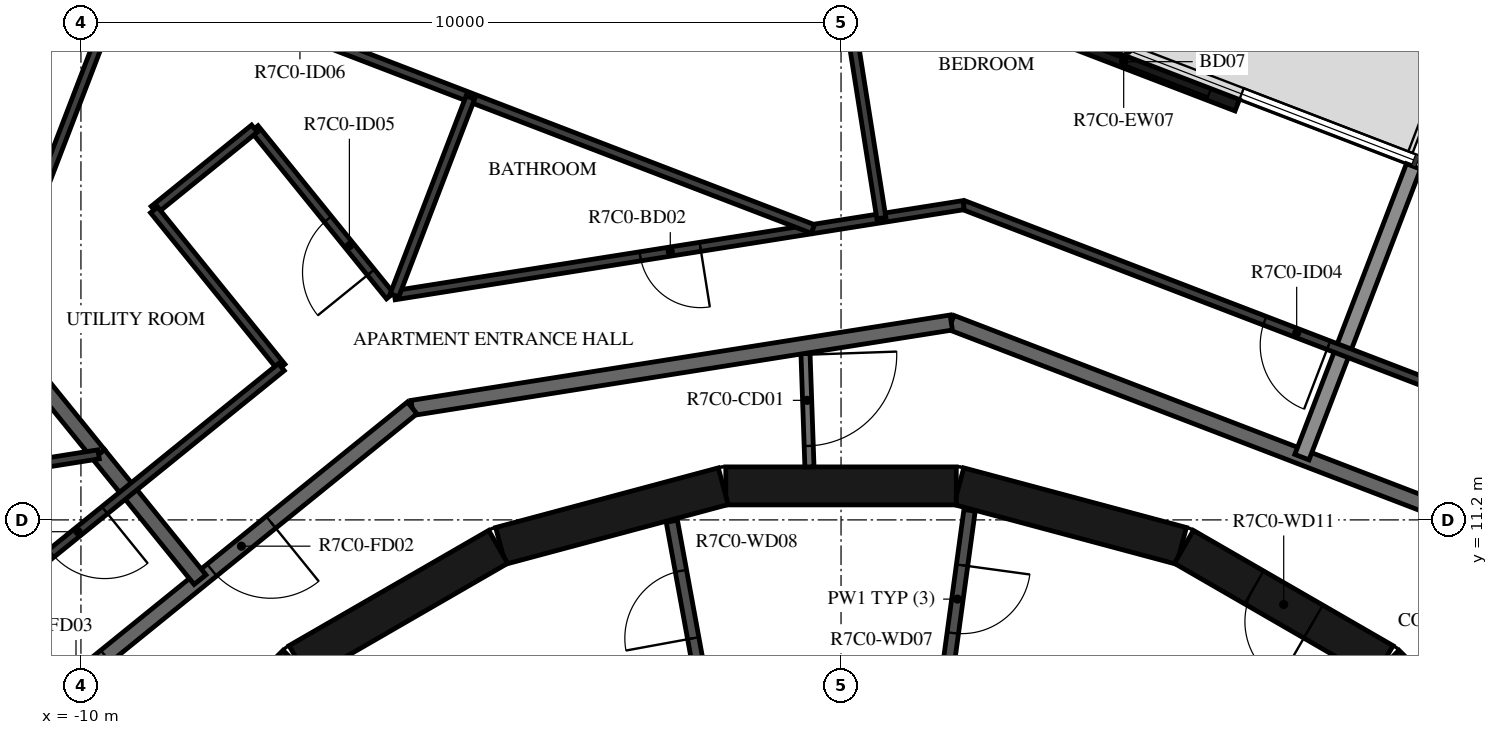
"""IFC4 building model, lengths in metres.
Left out: names, types, materials, properties, quantities, classifications, styles, units other than length and angle.
Written with IfcOpenShell. Run it as: python <this file> out.ifc"""

import sys

from ifc_helpers import new_model, si_unit, direction, frame, frame_2d, origin, place, context, subcontext, project, spatial, rectangle, extrude, element, fill, save


model = new_model("IFC4")
c1 = context("Model", 3, precision=1e-05, world=origin(), true_north=direction((0.0, 1.0)))
c2 = subcontext(c1, "Body", "Model", "MODEL_VIEW")
j1 = project(units=[si_unit("LENGTHUNIT", "METRE"), si_unit("PLANEANGLEUNIT", "RADIAN")], contexts=[c1])
p1 = place(None, origin())
s1 = spatial("IfcSite", under=j1, at=p1, CompositionType="ELEMENT")
p2 = place(p1, origin())
s2 = spatial("IfcBuilding", under=s1, at=p2, CompositionType="ELEMENT")
p3 = place(p2, frame((0.0, 0.0, 284.4)))
s3 = spatial("IfcBuildingStorey", under=s2, at=p3, CompositionType="ELEMENT", Elevation=284.4)
p4 = place(p3, frame((5.212, 16.655, 0.0), z_axis=(0.0, 0.0, 1.0), x_axis=(-0.933579413923, 0.358370587381, 0.0)))
e1 = element("IfcWall", 1, at=p4, inside=s3, PredefinedType="STANDARD", context=c2, shape_type="SweptSolid", body=[
    extrude(rectangle(XDim=3.2, YDim=0.16, at=frame_2d((1.6, 0.0))), origin(), (0.0, 0.0, 1.0), 3.12),
])
p5 = place(p4, frame((0.4, 0.0, 0.0)))
e2 = element("IfcOpeningElement", 2, at=p5, cuts=e1, PredefinedType="OPENING", context=c2, shape_type="SweptSolid", body=[
    extrude(rectangle(XDim=2.4, YDim=2.4, at=frame_2d((1.2, 1.2))), frame((0.0, 0.09, 0.0), z_axis=(0.0, -1.0, 0.0), x_axis=(1.0, 0.0, 0.0)), (0.0, 0.0, 1.0), 0.18),
])
p6 = place(p3, frame((9.308, 7.164, 0.0), z_axis=(0.0, 0.0, 1.0), x_axis=(-0.707106781187, 0.707106781187, 0.0)))
e3 = element("IfcWall", 3, at=p6, inside=s3, PredefinedType="SHEAR", context=c2, shape_type="SweptSolid", body=[
    extrude(rectangle(XDim=3.032, YDim=0.5, at=frame_2d((1.516, 0.0))), origin(), (0.0, 0.0, 1.0), 3.12),
])
p7 = place(p6, frame((0.416, 0.0, 0.0)))
e4 = element("IfcOpeningElement", 4, at=p7, cuts=e3, PredefinedType="OPENING", context=c2, shape_type="SweptSolid", body=[
    extrude(rectangle(XDim=1.2, YDim=2.1, at=frame_2d((0.6, 1.05))), frame((0.0, 0.26, 0.0), z_axis=(0.0, -1.0, 0.0), x_axis=(1.0, 0.0, 0.0)), (0.0, 0.0, 1.0), 0.52),
])
p8 = place(p3, frame((7.137, 9.329, 0.0), z_axis=(0.0, 0.0, 1.0), x_axis=(-0.865975092491, 0.500087131594, 0.0)))
e5 = element("IfcWall", 5, at=p8, inside=s3, PredefinedType="SHEAR", context=c2, shape_type="SweptSolid", body=[
    extrude(rectangle(XDim=3.033, YDim=0.5, at=frame_2d((1.516, 0.0))), origin(), (0.0, 0.0, 1.0), 3.12),
])
p9 = place(p8, frame((1.066, 0.0, 0.0)))
e6 = element("IfcOpeningElement", 6, at=p9, cuts=e5, PredefinedType="OPENING", context=c2, shape_type="SweptSolid", body=[
    extrude(rectangle(XDim=0.9, YDim=2.1, at=frame_2d((0.45, 1.05))), frame((0.0, 0.26, 0.0), z_axis=(0.0, -1.0, 0.0), x_axis=(1.0, 0.0, 0.0)), (0.0, 0.0, 1.0), 0.52),
])
for number, where, z_axis, x_axis in (
    (7, (4.479, 10.858, 0.0), (0.0, 0.0, 1.0), (-0.966, 0.259, 0.0)),
    (8, (1.516, 11.647, 0.0), (0.0, 0.0, 1.0), (-1.0, 0.0, 0.0)),
    (9, (-1.55, 11.643, 0.0), (0.0, 0.0, 1.0), (-0.966, -0.259, 0.0)),
    (10, (-4.51, 10.845, 0.0), (0.0, 0.0, 1.0), (-0.866, -0.5, 0.0)),
):
    element("IfcWall", number, at=place(p3, frame(where, z_axis=z_axis, x_axis=x_axis)), inside=s3, PredefinedType="SHEAR", context=c2, shape_type="SweptSolid", body=[
        extrude(rectangle(XDim=3.033, YDim=0.5, at=frame_2d((1.516, 0.0))), origin(), (0.0, 0.0, 1.0), 3.12),
    ])
p10 = place(p3, frame((-7.164, 9.308, 0.0), z_axis=(0.0, 0.0, 1.0), x_axis=(-0.707106781187, -0.707106781187, 0.0)))
e11 = element("IfcWall", 11, at=p10, inside=s3, PredefinedType="SHEAR", context=c2, shape_type="SweptSolid", body=[
    extrude(rectangle(XDim=3.032, YDim=0.5, at=frame_2d((1.516, 0.0))), origin(), (0.0, 0.0, 1.0), 3.12),
])
p11 = place(p10, frame((1.416, 0.0, 0.0)))
e12 = element("IfcOpeningElement", 12, at=p11, cuts=e11, PredefinedType="OPENING", context=c2, shape_type="SweptSolid", body=[
    extrude(rectangle(XDim=1.2, YDim=2.1, at=frame_2d((0.6, 1.05))), frame((0.0, 0.26, 0.0), z_axis=(0.0, -1.0, 0.0), x_axis=(1.0, 0.0, 0.0)), (0.0, 0.0, 1.0), 0.52),
])
p12 = place(p3, frame((1.691, 11.326, 0.0), z_axis=(0.0, 0.0, 1.0), x_axis=(-0.135344253201, -0.990798633994, 0.0)))
e13 = element("IfcWall", 13, at=p12, inside=s3, PredefinedType="PARTITIONING", context=c2, shape_type="SweptSolid", body=[
    extrude(rectangle(XDim=2.358, YDim=0.15, at=frame_2d((1.179, 0.0))), origin(), (0.0, 0.0, 1.0), 3.12),
])
p13 = place(p12, frame((0.729, 0.0, 0.0)))
e14 = element("IfcOpeningElement", 14, at=p13, cuts=e13, PredefinedType="OPENING", context=c2, shape_type="SweptSolid", body=[
    extrude(rectangle(XDim=0.9, YDim=2.1, at=frame_2d((0.45, 1.05))), frame((0.0, 0.085, 0.0), z_axis=(0.0, -1.0, 0.0), x_axis=(1.0, 0.0, 0.0)), (0.0, 0.0, 1.0), 0.17),
])
p14 = place(p3, frame((-1.825, 8.99, 0.0), z_axis=(0.0, 0.0, 1.0), x_axis=(-0.179955206115, 0.983674805915, 0.0)))
e15 = element("IfcWall", 15, at=p14, inside=s3, PredefinedType="PARTITIONING", context=c2, shape_type="SweptSolid", body=[
    extrude(rectangle(XDim=2.229, YDim=0.15, at=frame_2d((1.115, 0.0))), origin(), (0.0, 0.0, 1.0), 3.12),
])
p15 = place(p14, frame((0.665, 0.0, 0.0)))
e16 = element("IfcOpeningElement", 16, at=p15, cuts=e15, PredefinedType="OPENING", context=c2, shape_type="SweptSolid", body=[
    extrude(rectangle(XDim=0.9, YDim=2.1, at=frame_2d((0.45, 1.05))), frame((0.0, 0.085, 0.0), z_axis=(0.0, -1.0, 0.0), x_axis=(1.0, 0.0, 0.0)), (0.0, 0.0, 1.0), 0.17),
])
p16 = place(p3, frame((-0.471, 13.492, 0.0), z_axis=(0.0, 0.0, 1.0), x_axis=(0.034873173869, -0.999391745886, 0.0)))
e17 = element("IfcWall", 17, at=p16, inside=s3, PredefinedType="PARTITIONING", context=c2, shape_type="SweptSolid", body=[
    extrude(rectangle(XDim=1.596, YDim=0.12, at=frame_2d((0.798, 0.0))), origin(), (0.0, 0.0, 1.0), 3.12),
])
p17 = place(p16, frame((0.12, 0.0, 0.0)))
e18 = element("IfcOpeningElement", 18, at=p17, cuts=e17, PredefinedType="OPENING", context=c2, shape_type="SweptSolid", body=[
    extrude(rectangle(XDim=1.2, YDim=2.1, at=frame_2d((0.6, 1.05))), frame((0.0, 0.07, 0.0), z_axis=(0.0, -1.0, 0.0), x_axis=(1.0, 0.0, 0.0)), (0.0, 0.0, 1.0), 0.14),
])
p18 = place(p3, frame((8.154, 11.223, 0.0), z_axis=(0.0, 0.0, 1.0), x_axis=(-0.93359073609, 0.358341090983, 0.0)))
e19 = element("IfcWall", 19, at=p18, inside=s3, PredefinedType="STANDARD", context=c2, shape_type="SweptSolid", body=[
    extrude(rectangle(XDim=7.181, YDim=0.2, at=frame_2d((3.59, 0.0))), origin(), (0.0, 0.0, 1.0), 3.12),
])
p19 = place(p3, frame((1.45, 13.797, 0.0), z_axis=(0.0, 0.0, 1.0), x_axis=(-0.987690361611, -0.156421704315, 0.0)))
e20 = element("IfcWall", 20, at=p19, inside=s3, PredefinedType="STANDARD", context=c2, shape_type="SweptSolid", body=[
    extrude(rectangle(XDim=7.181, YDim=0.2, at=frame_2d((3.591, 0.0))), origin(), (0.0, 0.0, 1.0), 3.12),
])
p20 = place(p3, frame((-5.643, 12.673, 0.0), z_axis=(0.0, 0.0, 1.0), x_axis=(-0.777160148113, -0.629302871585, 0.0)))
e21 = element("IfcWall", 21, at=p20, inside=s3, PredefinedType="STANDARD", context=c2, shape_type="SweptSolid", body=[
    extrude(rectangle(XDim=7.181, YDim=0.2, at=frame_2d((3.59, 0.0))), origin(), (0.0, 0.0, 1.0), 3.12),
])
p21 = place(p20, frame((2.39, 0.0, 0.0)))
e22 = element("IfcOpeningElement", 22, at=p21, cuts=e21, PredefinedType="OPENING", context=c2, shape_type="SweptSolid", body=[
    extrude(rectangle(XDim=1.0, YDim=2.1, at=frame_2d((0.5, 1.05))), frame((0.0, 0.11, 0.0), z_axis=(0.0, -1.0, 0.0), x_axis=(1.0, 0.0, 0.0)), (0.0, 0.0, 1.0), 0.22),
])
p22 = place(p20, frame((5.19, 0.0, 0.0)))
e23 = element("IfcOpeningElement", 23, at=p22, cuts=e21, PredefinedType="OPENING", context=c2, shape_type="SweptSolid", body=[
    extrude(rectangle(XDim=1.0, YDim=2.1, at=frame_2d((0.5, 1.05))), frame((0.0, 0.11, 0.0), z_axis=(0.0, -1.0, 0.0), x_axis=(1.0, 0.0, 0.0)), (0.0, 0.0, 1.0), 0.22),
])
p23 = place(p3, frame((7.532, 15.85, 0.0), z_axis=(0.0, 0.0, 1.0), x_axis=(-0.358355996975, -0.933585014571, 0.0)))
e24 = element("IfcWall", 24, at=p23, inside=s3, PredefinedType="STANDARD", context=c2, shape_type="SweptSolid", body=[
    extrude(rectangle(XDim=4.096, YDim=0.2, at=frame_2d((2.048, 0.0))), origin(), (0.0, 0.0, 1.0), 2.73),
])
p24 = place(p3, frame((-9.768, 12.062, 0.0), z_axis=(0.0, 0.0, 1.0), x_axis=(0.629274383598, -0.777183215302, 0.0)))
e25 = element("IfcWall", 25, at=p24, inside=s3, PredefinedType="STANDARD", context=c2, shape_type="SweptSolid", body=[
    extrude(rectangle(XDim=2.121, YDim=0.2, at=frame_2d((1.061, 0.0))), origin(), (0.0, 0.0, 1.0), 3.12),
])
p25 = place(p3, frame((-10.779, 13.311, 0.0), z_axis=(0.0, 0.0, 1.0), x_axis=(0.629373100483, -0.77710327524, 0.0)))
e26 = element("IfcWall", 26, at=p25, inside=s3, PredefinedType="STANDARD", context=c2, shape_type="SweptSolid", body=[
    extrude(rectangle(XDim=1.606, YDim=0.2, at=frame_2d((0.803, 0.0))), origin(), (0.0, 0.0, 1.0), 3.12),
])
p26 = place(p3, frame((9.067, 12.479, 0.0), z_axis=(0.0, 0.0, 1.0), x_axis=(-0.933579449035, 0.358370495911, 0.0)))
e27 = element("IfcWall", 27, at=p26, inside=s3, PredefinedType="PARTITIONING", context=c2, shape_type="SweptSolid", body=[
    extrude(rectangle(XDim=7.985, YDim=0.12, at=frame_2d((3.992, 0.0))), origin(), (0.0, 0.0, 1.0), 3.12),
])
p27 = place(p26, frame((2.841, 0.0, 0.0)))
e28 = element("IfcOpeningElement", 28, at=p27, cuts=e27, PredefinedType="OPENING", context=c2, shape_type="SweptSolid", body=[
    extrude(rectangle(XDim=0.9, YDim=2.1, at=frame_2d((0.45, 1.05))), frame((0.0, 0.07, 0.0), z_axis=(0.0, -1.0, 0.0), x_axis=(1.0, 0.0, 0.0)), (0.0, 0.0, 1.0), 0.14),
])
p28 = place(p3, frame((1.612, 15.341, 0.0), z_axis=(0.0, 0.0, 1.0), x_axis=(-0.987690790621, -0.156418995404, 0.0)))
e29 = element("IfcWall", 29, at=p28, inside=s3, PredefinedType="PARTITIONING", context=c2, shape_type="SweptSolid", body=[
    extrude(rectangle(XDim=7.581, YDim=0.12, at=frame_2d((3.791, 0.0))), origin(), (0.0, 0.0, 1.0), 3.12),
])
p29 = place(p28, frame((3.507, 0.0, 0.0)))
e30 = element("IfcOpeningElement", 30, at=p29, cuts=e29, PredefinedType="OPENING", context=c2, shape_type="SweptSolid", body=[
    extrude(rectangle(XDim=0.8, YDim=2.1, at=frame_2d((0.4, 1.05))), frame((0.0, 0.07, 0.0), z_axis=(0.0, -1.0, 0.0), x_axis=(1.0, 0.0, 0.0)), (0.0, 0.0, 1.0), 0.14),
])
p30 = place(p3, frame((-5.933, 14.146, 0.0), z_axis=(0.0, 0.0, 1.0), x_axis=(-0.62930727886, 0.777156579316, 0.0)))
e31 = element("IfcWall", 31, at=p30, inside=s3, PredefinedType="PARTITIONING", context=c2, shape_type="SweptSolid", body=[
    extrude(rectangle(XDim=2.833, YDim=0.12, at=frame_2d((1.417, 0.0))), origin(), (0.0, 0.0, 1.0), 3.12),
])
p31 = place(p30, frame((0.4, 0.0, 0.0)))
e32 = element("IfcOpeningElement", 32, at=p31, cuts=e31, PredefinedType="OPENING", context=c2, shape_type="SweptSolid", body=[
    extrude(rectangle(XDim=0.9, YDim=2.1, at=frame_2d((0.45, 1.05))), frame((0.0, 0.07, 0.0), z_axis=(0.0, -1.0, 0.0), x_axis=(1.0, 0.0, 0.0)), (0.0, 0.0, 1.0), 0.14),
])
p32 = place(p3, frame((-7.717, 16.348, 0.0), z_axis=(0.0, 0.0, 1.0), x_axis=(-0.777184671515, -0.629272585103, 0.0)))
e33 = element("IfcWall", 33, at=p32, inside=s3, PredefinedType="PARTITIONING", context=c2, shape_type="SweptSolid", body=[
    extrude(rectangle(XDim=1.7, YDim=0.12, at=frame_2d((0.85, 0.0))), origin(), (0.0, 0.0, 1.0), 3.12),
])
p33 = place(p3, frame((-9.038, 15.278, 0.0), z_axis=(0.0, 0.0, 1.0), x_axis=(0.629338090938, -0.777131628037, 0.0)))
e34 = element("IfcWall", 34, at=p33, inside=s3, PredefinedType="PARTITIONING", context=c2, shape_type="SweptSolid", body=[
    extrude(rectangle(XDim=2.661, YDim=0.12, at=frame_2d((1.331, 0.0))), origin(), (0.0, 0.0, 1.0), 3.12),
])
p34 = place(p3, frame((-7.363, 13.21, 0.0), z_axis=(0.0, 0.0, 1.0), x_axis=(-0.777139504663, -0.629328364443, 0.0)))
e35 = element("IfcWall", 35, at=p34, inside=s3, PredefinedType="PARTITIONING", context=c2, shape_type="SweptSolid", body=[
    extrude(rectangle(XDim=6.584, YDim=0.12, at=frame_2d((3.292, 0.0))), origin(), (0.0, 0.0, 1.0), 3.12),
])
p35 = place(p34, frame((2.991, 0.0, 0.0)))
e36 = element("IfcOpeningElement", 36, at=p35, cuts=e35, PredefinedType="OPENING", context=c2, shape_type="SweptSolid", body=[
    extrude(rectangle(XDim=0.9, YDim=2.1, at=frame_2d((0.45, 1.05))), frame((0.0, 0.07, 0.0), z_axis=(0.0, -1.0, 0.0), x_axis=(1.0, 0.0, 0.0)), (0.0, 0.0, 1.0), 0.14),
])
p36 = place(p3, frame((-0.037, 18.756, 0.0), z_axis=(0.0, 0.0, 1.0), x_axis=(0.156421851095, -0.987690338365, 0.0)))
e37 = element("IfcWall", 37, at=p36, inside=s3, PredefinedType="PARTITIONING", context=c2, shape_type="SweptSolid", body=[
    extrude(rectangle(XDim=3.63, YDim=0.12, at=frame_2d((1.815, 0.0))), origin(), (0.0, 0.0, 1.0), 3.12),
])
p37 = place(p3, frame((-10.18, 18.793, 0.0), z_axis=(0.0, 0.0, 1.0), x_axis=(0.933574148929, -0.358384302742, 0.0)))
e38 = element("IfcWall", 38, at=p37, inside=s3, PredefinedType="PARTITIONING", context=c2, shape_type="SweptSolid", body=[
    extrude(rectangle(XDim=10.509, YDim=0.12, at=frame_2d((5.254, 0.0))), origin(), (0.0, 0.0, 1.0), 3.12),
])
p38 = place(p37, frame((2.829, 0.0, 0.0)))
e39 = element("IfcOpeningElement", 39, at=p38, cuts=e38, PredefinedType="OPENING", context=c2, shape_type="SweptSolid", body=[
    extrude(rectangle(XDim=0.9, YDim=2.1, at=frame_2d((0.45, 1.05))), frame((0.0, 0.07, 0.0), z_axis=(0.0, -1.0, 0.0), x_axis=(1.0, 0.0, 0.0)), (0.0, 0.0, 1.0), 0.14),
])
p39 = place(p3, frame((-4.876, 16.757, 0.0), z_axis=(0.0, 0.0, 1.0), x_axis=(-0.358380240487, -0.933575708354, 0.0)))
e40 = element("IfcWall", 40, at=p39, inside=s3, PredefinedType="PARTITIONING", context=c2, shape_type="SweptSolid", body=[
    extrude(rectangle(XDim=2.787, YDim=0.12, at=frame_2d((1.394, 0.0))), origin(), (0.0, 0.0, 1.0), 3.12),
])
p40 = place(p3, frame((-9.383, 18.487, 0.0), z_axis=(0.0, 0.0, 1.0), x_axis=(-0.358340198137, -0.933591078792, 0.0)))
e41 = element("IfcWall", 41, at=p40, inside=s3, PredefinedType="PARTITIONING", context=c2, shape_type="SweptSolid", body=[
    extrude(rectangle(XDim=3.125, YDim=0.12, at=frame_2d((1.562, 0.0))), origin(), (0.0, 0.0, 1.0), 3.12),
])
p41 = place(p40, frame((0.2, 0.0, 0.0)))
e42 = element("IfcOpeningElement", 42, at=p41, cuts=e41, PredefinedType="OPENING", context=c2, shape_type="SweptSolid", body=[
    extrude(rectangle(XDim=0.9, YDim=2.1, at=frame_2d((0.45, 1.05))), frame((0.0, 0.07, 0.0), z_axis=(0.0, -1.0, 0.0), x_axis=(1.0, 0.0, 0.0)), (0.0, 0.0, 1.0), 0.14),
])
p42 = place(p3, frame((-15.828, 11.102, 0.0), z_axis=(0.0, 0.0, 1.0), x_axis=(0.98768671358, 0.156444737262, 0.0)))
e43 = element("IfcWall", 43, at=p42, inside=s3, PredefinedType="PARTITIONING", context=c2, shape_type="SweptSolid", body=[
    extrude(rectangle(XDim=6.136, YDim=0.12, at=frame_2d((3.068, 0.0))), origin(), (0.0, 0.0, 1.0), 3.12),
])
p43 = place(p42, frame((0.2, 0.0, 0.0)))
e44 = element("IfcOpeningElement", 44, at=p43, cuts=e43, PredefinedType="OPENING", context=c2, shape_type="SweptSolid", body=[
    extrude(rectangle(XDim=0.9, YDim=2.1, at=frame_2d((0.45, 1.05))), frame((0.0, 0.07, 0.0), z_axis=(0.0, -1.0, 0.0), x_axis=(1.0, 0.0, 0.0)), (0.0, 0.0, 1.0), 0.14),
])
p44 = place(p5, origin())
e45 = element("IfcDoor", 45, at=p44, inside=s3, OperationType="DOUBLE_DOOR_SLIDING", PredefinedType="DOOR", context=c2, shape_type="SweptSolid", body=[
    extrude(rectangle(XDim=2.4, YDim=2.4, at=frame_2d((1.2, 1.2))), frame((0.0, 0.025, 0.0), z_axis=(0.0, -1.0, 0.0), x_axis=(1.0, 0.0, 0.0)), (0.0, 0.0, 1.0), 0.05),
])
fill(e2, e45)
p45 = place(p13, origin())
e46 = element("IfcDoor", 46, at=p45, inside=s3, OperationType="SINGLE_SWING_LEFT", PredefinedType="DOOR", context=c2, shape_type="SweptSolid", body=[
    extrude(rectangle(XDim=0.9, YDim=2.1, at=frame_2d((0.45, 1.05))), frame((0.0, 0.025, 0.0), z_axis=(0.0, -1.0, 0.0), x_axis=(1.0, 0.0, 0.0)), (0.0, 0.0, 1.0), 0.05),
])
fill(e14, e46)
p46 = place(p15, origin())
e47 = element("IfcDoor", 47, at=p46, inside=s3, OperationType="SINGLE_SWING_RIGHT", PredefinedType="DOOR", context=c2, shape_type="SweptSolid", body=[
    extrude(rectangle(XDim=0.9, YDim=2.1, at=frame_2d((0.45, 1.05))), frame((0.0, 0.025, 0.0), z_axis=(0.0, -1.0, 0.0), x_axis=(1.0, 0.0, 0.0)), (0.0, 0.0, 1.0), 0.05),
])
fill(e16, e47)
p47 = place(p9, origin())
e48 = element("IfcDoor", 48, at=p47, inside=s3, OperationType="SINGLE_SWING_LEFT", PredefinedType="DOOR", context=c2, shape_type="SweptSolid", body=[
    extrude(rectangle(XDim=0.9, YDim=2.1, at=frame_2d((0.45, 1.05))), frame((0.0, 0.025, 0.0), z_axis=(0.0, -1.0, 0.0), x_axis=(1.0, 0.0, 0.0)), (0.0, 0.0, 1.0), 0.05),
])
fill(e6, e48)
p48 = place(p21, origin())
e49 = element("IfcDoor", 49, at=p48, inside=s3, OperationType="SINGLE_SWING_RIGHT", PredefinedType="DOOR", context=c2, shape_type="SweptSolid", body=[
    extrude(rectangle(XDim=1.0, YDim=2.1, at=frame_2d((0.5, 1.05))), frame((0.0, 0.025, 0.0), z_axis=(0.0, -1.0, 0.0), x_axis=(1.0, 0.0, 0.0)), (0.0, 0.0, 1.0), 0.05),
])
fill(e22, e49)
p49 = place(p27, origin())
e50 = element("IfcDoor", 50, at=p49, inside=s3, OperationType="SINGLE_SWING_LEFT", PredefinedType="DOOR", context=c2, shape_type="SweptSolid", body=[
    extrude(rectangle(XDim=0.9, YDim=2.1, at=frame_2d((0.45, 1.05))), frame((0.0, 0.025, 0.0), z_axis=(0.0, -1.0, 0.0), x_axis=(1.0, 0.0, 0.0)), (0.0, 0.0, 1.0), 0.05),
])
fill(e28, e50)
p50 = place(p29, origin())
e51 = element("IfcDoor", 51, at=p50, inside=s3, OperationType="SINGLE_SWING_RIGHT", PredefinedType="DOOR", context=c2, shape_type="SweptSolid", body=[
    extrude(rectangle(XDim=0.8, YDim=2.1, at=frame_2d((0.4, 1.05))), frame((0.0, 0.025, 0.0), z_axis=(0.0, -1.0, 0.0), x_axis=(1.0, 0.0, 0.0)), (0.0, 0.0, 1.0), 0.05),
])
fill(e30, e51)
p51 = place(p31, origin())
e52 = element("IfcDoor", 52, at=p51, inside=s3, OperationType="SINGLE_SWING_RIGHT", PredefinedType="DOOR", context=c2, shape_type="SweptSolid", body=[
    extrude(rectangle(XDim=0.9, YDim=2.1, at=frame_2d((0.45, 1.05))), frame((0.0, 0.025, 0.0), z_axis=(0.0, -1.0, 0.0), x_axis=(1.0, 0.0, 0.0)), (0.0, 0.0, 1.0), 0.05),
])
fill(e32, e52)
p52 = place(p22, origin())
e53 = element("IfcDoor", 53, at=p52, inside=s3, OperationType="SINGLE_SWING_LEFT", PredefinedType="DOOR", context=c2, shape_type="SweptSolid", body=[
    extrude(rectangle(XDim=1.0, YDim=2.1, at=frame_2d((0.5, 1.05))), frame((0.0, 0.025, 0.0), z_axis=(0.0, -1.0, 0.0), x_axis=(1.0, 0.0, 0.0)), (0.0, 0.0, 1.0), 0.05),
])
fill(e23, e53)
p53 = place(p35, origin())
e54 = element("IfcDoor", 54, at=p53, inside=s3, OperationType="SINGLE_SWING_LEFT", PredefinedType="DOOR", context=c2, shape_type="SweptSolid", body=[
    extrude(rectangle(XDim=0.9, YDim=2.1, at=frame_2d((0.45, 1.05))), frame((0.0, 0.025, 0.0), z_axis=(0.0, -1.0, 0.0), x_axis=(1.0, 0.0, 0.0)), (0.0, 0.0, 1.0), 0.05),
])
fill(e36, e54)
p54 = place(p17, origin())
e55 = element("IfcDoor", 55, at=p54, inside=s3, OperationType="DOUBLE_DOOR_SINGLE_SWING", PredefinedType="DOOR", context=c2, shape_type="SweptSolid", body=[
    extrude(rectangle(XDim=1.2, YDim=2.1, at=frame_2d((0.6, 1.05))), frame((0.0, 0.025, 0.0), z_axis=(0.0, -1.0, 0.0), x_axis=(1.0, 0.0, 0.0)), (0.0, 0.0, 1.0), 0.05),
])
fill(e18, e55)
save(model, sys.argv[1])
